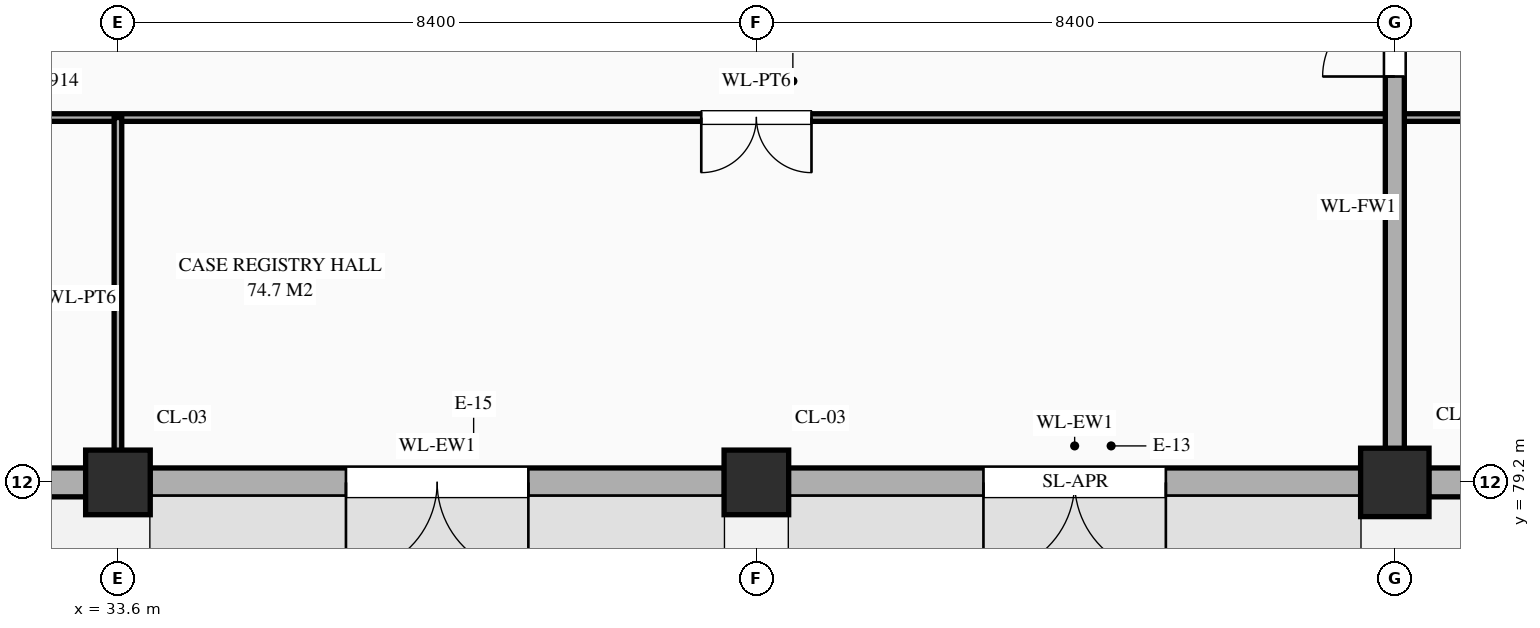
"""IFC4 building model, lengths in metres.
Left out: names, types, materials, properties, quantities, classifications, styles, units other than length and angle.
Written with IfcOpenShell. Run it as: python <this file> out.ifc"""

import sys

from ifc_helpers import new_model, si_unit, direction, frame, frame_2d, origin, origin_2d, place, context, subcontext, project, spatial, rectangle, extrude, element, fill, save


model = new_model("IFC4")
c1 = context("Model", 3, precision=1e-05, world=origin(), true_north=direction((0.0, 1.0)))
c2 = subcontext(c1, "Body", "Model", "MODEL_VIEW")
j1 = project(units=[si_unit("LENGTHUNIT", "METRE"), si_unit("PLANEANGLEUNIT", "RADIAN")], contexts=[c1])
p1 = place(None, origin())
s1 = spatial("IfcSite", under=j1, at=p1, CompositionType="ELEMENT")
p2 = place(p1, origin())
s2 = spatial("IfcBuilding", under=s1, at=p2, CompositionType="ELEMENT")
p3 = place(p2, origin())
s3 = spatial("IfcBuildingStorey", under=s2, at=p3, CompositionType="ELEMENT", Elevation=0.0)
for number, where, z_axis, x_axis in (
    (1, (33.6, 79.2, 0.0), (0.0, 0.0, 1.0), (1.0, 0.0, 0.0)),
    (2, (42.0, 79.2, 0.0), (0.0, 0.0, 1.0), (1.0, 0.0, 0.0)),
):
    element("IfcColumn", number, at=place(p3, frame(where, z_axis=z_axis, x_axis=x_axis)), inside=s3, PredefinedType="COLUMN", context=c2, shape_type="SweptSolid", body=[
        extrude(rectangle(XDim=0.85, YDim=0.85, at=origin_2d()), origin(), (0.0, 0.0, 1.0), 5.4),
    ])
p4 = place(p3, frame((50.4, 79.2, 0.0), z_axis=(0.0, 0.0, 1.0), x_axis=(1.0, 0.0, 0.0)))
e3 = element("IfcColumn", 3, at=p4, inside=s3, PredefinedType="COLUMN", context=c2, shape_type="SweptSolid", body=[
    extrude(rectangle(XDim=0.9, YDim=0.9, at=origin_2d()), origin(), (0.0, 0.0, 1.0), 5.4),
])
p5 = place(p3, frame((25.62, 79.2, 0.0), z_axis=(0.0, 0.0, 1.0), x_axis=(1.0, 0.0, 0.0)))
e4 = element("IfcWall", 4, at=p5, inside=s3, PredefinedType="STANDARD", context=c2, shape_type="SweptSolid", body=[
    extrude(rectangle(XDim=7.56, YDim=0.38, at=frame_2d((3.78, 0.0))), origin(), (0.0, 0.0, 1.0), 4.47),
])
p6 = place(p5, frame((3.18, 0.0, 0.0)))
e5 = element("IfcOpeningElement", 5, at=p6, cuts=e4, PredefinedType="OPENING", context=c2, shape_type="SweptSolid", body=[
    extrude(rectangle(XDim=1.2, YDim=2.2, at=frame_2d((0.6, 1.1))), frame((0.0, 0.202, 0.0), z_axis=(0.0, -1.0, 0.0), x_axis=(1.0, 0.0, 0.0)), (0.0, 0.0, 1.0), 0.404),
])
p7 = place(p3, frame((34.02, 79.2, 0.0), z_axis=(0.0, 0.0, 1.0), x_axis=(1.0, 0.0, 0.0)))
e6 = element("IfcWall", 6, at=p7, inside=s3, PredefinedType="STANDARD", context=c2, shape_type="SweptSolid", body=[
    extrude(rectangle(XDim=7.56, YDim=0.38, at=frame_2d((3.78, 0.0))), origin(), (0.0, 0.0, 1.0), 4.47),
])
p8 = place(p7, frame((2.58, 0.0, 0.0)))
e7 = element("IfcOpeningElement", 7, at=p8, cuts=e6, PredefinedType="OPENING", context=c2, shape_type="SweptSolid", body=[
    extrude(rectangle(XDim=2.4, YDim=2.4, at=frame_2d((1.2, 1.2))), frame((0.0, 0.202, 0.0), z_axis=(0.0, -1.0, 0.0), x_axis=(1.0, 0.0, 0.0)), (0.0, 0.0, 1.0), 0.404),
])
p9 = place(p3, frame((42.42, 79.2, 0.0), z_axis=(0.0, 0.0, 1.0), x_axis=(1.0, 0.0, 0.0)))
e8 = element("IfcWall", 8, at=p9, inside=s3, PredefinedType="STANDARD", context=c2, shape_type="SweptSolid", body=[
    extrude(rectangle(XDim=7.535, YDim=0.38, at=frame_2d((3.768, 0.0))), origin(), (0.0, 0.0, 1.0), 4.47),
])
p10 = place(p9, frame((2.567, 0.0, 0.0)))
e9 = element("IfcOpeningElement", 9, at=p10, cuts=e8, PredefinedType="OPENING", context=c2, shape_type="SweptSolid", body=[
    extrude(rectangle(XDim=2.4, YDim=2.4, at=frame_2d((1.2, 1.2))), frame((0.0, 0.202, 0.0), z_axis=(0.0, -1.0, 0.0), x_axis=(1.0, 0.0, 0.0)), (0.0, 0.0, 1.0), 0.404),
])
p11 = place(p3, frame((50.845, 79.2, 0.0), z_axis=(0.0, 0.0, 1.0), x_axis=(1.0, 0.0, 0.0)))
e10 = element("IfcWall", 10, at=p11, inside=s3, PredefinedType="STANDARD", context=c2, shape_type="SweptSolid", body=[
    extrude(rectangle(XDim=7.51, YDim=0.38, at=frame_2d((3.755, 0.0))), origin(), (0.0, 0.0, 1.0), 4.47),
])
p12 = place(p11, frame((3.155, 0.0, 0.0)))
e11 = element("IfcOpeningElement", 11, at=p12, cuts=e10, PredefinedType="OPENING", context=c2, shape_type="SweptSolid", body=[
    extrude(rectangle(XDim=1.2, YDim=2.2, at=frame_2d((0.6, 1.1))), frame((0.0, 0.202, 0.0), z_axis=(0.0, -1.0, 0.0), x_axis=(1.0, 0.0, 0.0)), (0.0, 0.0, 1.0), 0.404),
])
p13 = place(p3, frame((30.8, 84.0, 0.0), z_axis=(0.0, 0.0, 1.0), x_axis=(1.0, 0.0, 0.0)))
e12 = element("IfcWall", 12, at=p13, inside=s3, PredefinedType="STANDARD", context=c2, shape_type="SweptSolid", body=[
    extrude(rectangle(XDim=22.4, YDim=0.1, at=frame_2d((11.2, 0.0))), origin(), (0.0, 0.0, 1.0), 5.12),
])
p14 = place(p13, frame((0.89, 0.0, 0.0)))
e13 = element("IfcOpeningElement", 13, at=p14, cuts=e12, PredefinedType="OPENING", context=c2, shape_type="SweptSolid", body=[
    extrude(rectangle(XDim=1.02, YDim=2.4, at=frame_2d((0.51, 1.2))), frame((0.0, 0.062, 0.0), z_axis=(0.0, -1.0, 0.0), x_axis=(1.0, 0.0, 0.0)), (0.0, 0.0, 1.0), 0.124),
])
p15 = place(p13, frame((10.475, 0.0, 0.0)))
e14 = element("IfcOpeningElement", 14, at=p15, cuts=e12, PredefinedType="OPENING", context=c2, shape_type="SweptSolid", body=[
    extrude(rectangle(XDim=1.45, YDim=2.3, at=frame_2d((0.725, 1.15))), frame((0.0, 0.062, 0.0), z_axis=(0.0, -1.0, 0.0), x_axis=(1.0, 0.0, 0.0)), (0.0, 0.0, 1.0), 0.124),
])
p16 = place(p13, frame((20.55, 0.0, 0.0)))
e15 = element("IfcOpeningElement", 15, at=p16, cuts=e12, PredefinedType="OPENING", context=c2, shape_type="SweptSolid", body=[
    extrude(rectangle(XDim=0.9, YDim=2.15, at=frame_2d((0.45, 1.075))), frame((0.0, 0.062, 0.0), z_axis=(0.0, -1.0, 0.0), x_axis=(1.0, 0.0, 0.0)), (0.0, 0.0, 1.0), 0.124),
])
p17 = place(p3, frame((33.6, 79.24, 0.0), z_axis=(0.0, 0.0, 1.0), x_axis=(0.0, 1.0, 0.0)))
e16 = element("IfcWall", 16, at=p17, inside=s3, PredefinedType="STANDARD", context=c2, shape_type="SweptSolid", body=[
    extrude(rectangle(XDim=4.76, YDim=0.1, at=frame_2d((2.38, 0.0))), origin(), (0.0, 0.0, 1.0), 4.37),
])
p18 = place(p3, frame((50.4, 79.24, 0.0), z_axis=(0.0, 0.0, 1.0), x_axis=(0.0, 1.0, 0.0)))
e17 = element("IfcWall", 17, at=p18, inside=s3, PredefinedType="STANDARD", context=c2, shape_type="SweptSolid", body=[
    extrude(rectangle(XDim=7.16, YDim=0.25, at=frame_2d((3.58, 0.0))), origin(), (0.0, 0.0, 1.0), 4.37),
])
p19 = place(p18, frame((5.3, 0.0, 0.0)))
e18 = element("IfcOpeningElement", 18, at=p19, cuts=e17, PredefinedType="OPENING", context=c2, shape_type="SweptSolid", body=[
    extrude(rectangle(XDim=0.95, YDim=2.15, at=frame_2d((0.475, 1.075))), frame((0.0, 0.137, 0.0), z_axis=(0.0, -1.0, 0.0), x_axis=(1.0, 0.0, 0.0)), (0.0, 0.0, 1.0), 0.274),
])
p20 = place(p8, frame((2.4, 0.0, 0.0), z_axis=(0.0, 0.0, 1.0), x_axis=(-1.0, 0.0, 0.0)))
e19 = element("IfcDoor", 19, at=p20, inside=s3, OperationType="DOUBLE_DOOR_SINGLE_SWING", PredefinedType="DOOR", context=c2, shape_type="SweptSolid", body=[
    extrude(rectangle(XDim=2.4, YDim=2.4, at=frame_2d((1.2, 1.2))), frame((0.0, 0.025, 0.0), z_axis=(0.0, -1.0, 0.0), x_axis=(1.0, 0.0, 0.0)), (0.0, 0.0, 1.0), 0.05),
])
fill(e7, e19)
p21 = place(p10, frame((2.4, 0.0, 0.0), z_axis=(0.0, 0.0, 1.0), x_axis=(-1.0, 0.0, 0.0)))
e20 = element("IfcDoor", 20, at=p21, inside=s3, OperationType="DOUBLE_DOOR_SINGLE_SWING", PredefinedType="DOOR", context=c2, shape_type="SweptSolid", body=[
    extrude(rectangle(XDim=2.4, YDim=2.4, at=frame_2d((1.2, 1.2))), frame((0.0, 0.025, 0.0), z_axis=(0.0, -1.0, 0.0), x_axis=(1.0, 0.0, 0.0)), (0.0, 0.0, 1.0), 0.05),
])
fill(e9, e20)
p22 = place(p19, origin())
e21 = element("IfcDoor", 21, at=p22, inside=s3, OperationType="SINGLE_SWING_LEFT", PredefinedType="DOOR", context=c2, shape_type="SweptSolid", body=[
    extrude(rectangle(XDim=0.95, YDim=2.15, at=frame_2d((0.475, 1.075))), frame((0.0, 0.025, 0.0), z_axis=(0.0, -1.0, 0.0), x_axis=(1.0, 0.0, 0.0)), (0.0, 0.0, 1.0), 0.05),
])
fill(e18, e21)
p23 = place(p15, frame((1.45, 0.0, 0.0), z_axis=(0.0, 0.0, 1.0), x_axis=(-1.0, 0.0, 0.0)))
e22 = element("IfcDoor", 22, at=p23, inside=s3, OperationType="DOUBLE_DOOR_SINGLE_SWING", PredefinedType="DOOR", context=c2, shape_type="SweptSolid", body=[
    extrude(rectangle(XDim=1.45, YDim=2.3, at=frame_2d((0.725, 1.15))), frame((0.0, 0.025, 0.0), z_axis=(0.0, -1.0, 0.0), x_axis=(1.0, 0.0, 0.0)), (0.0, 0.0, 1.0), 0.05),
])
fill(e14, e22)
save(model, sys.argv[1])
